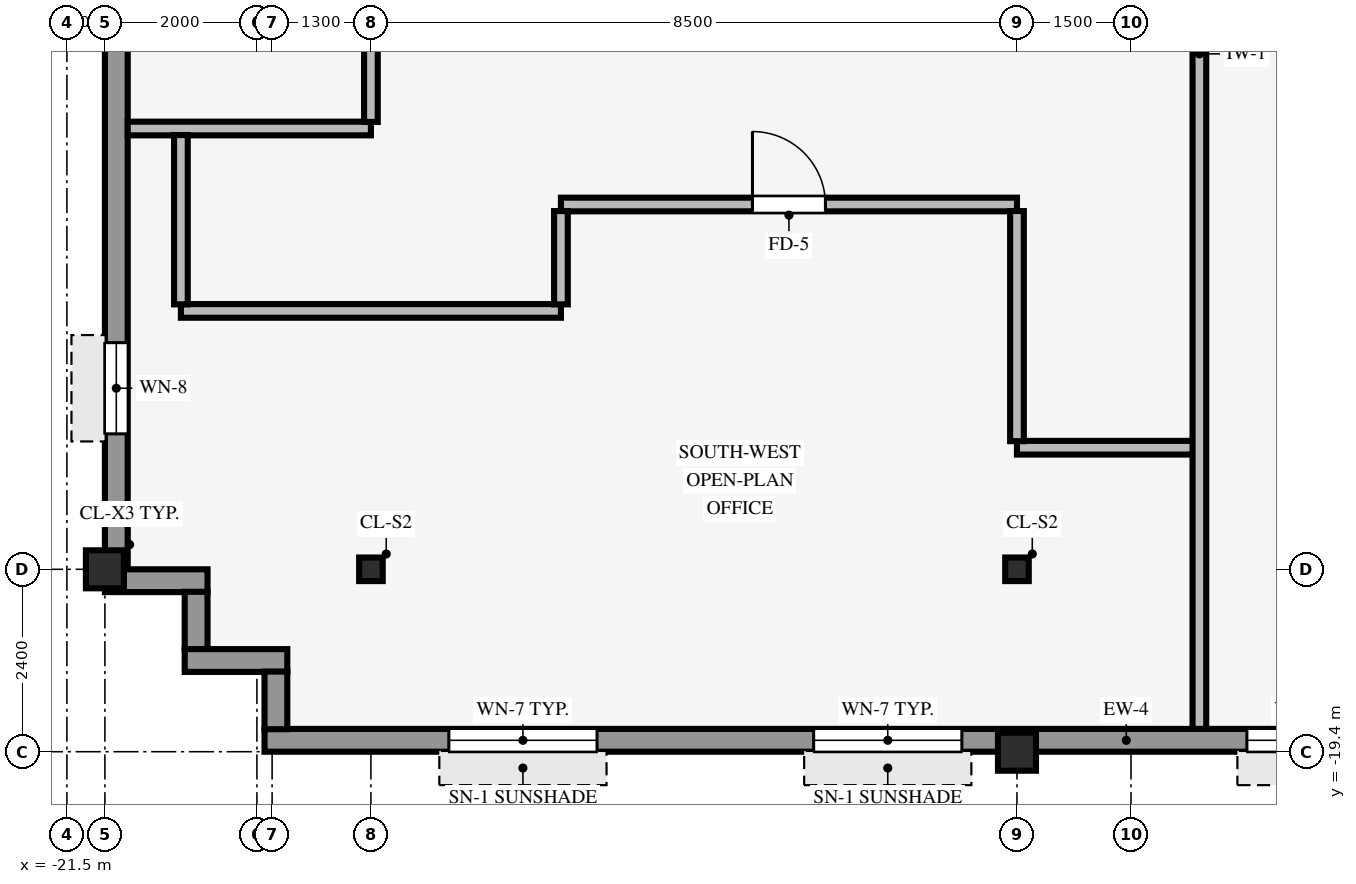
"""IFC4 building model, lengths in metres.
Left out: names, types, materials, properties, quantities, classifications, styles, units other than length and angle.
Written with IfcOpenShell. Run it as: python <this file> out.ifc"""

import sys

from ifc_helpers import new_model, si_unit, direction, frame, frame_2d, origin, origin_2d, place, context, subcontext, project, spatial, rectangle, hollow_rectangle, i_section, extrude, source, transform, mapped, element, fill, save


model = new_model("IFC4")
c1 = context("Model", 3, precision=1e-05, world=origin(), true_north=direction((0.0, 1.0)))
c2 = subcontext(c1, "Body", "Model", "MODEL_VIEW")
j1 = project(units=[si_unit("LENGTHUNIT", "METRE"), si_unit("PLANEANGLEUNIT", "RADIAN")], contexts=[c1])
p1 = place(None, origin())
s1 = spatial("IfcSite", under=j1, at=p1, CompositionType="ELEMENT")
p2 = place(p1, origin())
s2 = spatial("IfcBuilding", under=s1, at=p2, CompositionType="ELEMENT")
p3 = place(p2, frame((0.0, 0.0, 245.65)))
s3 = spatial("IfcBuildingStorey", under=s2, at=p3, CompositionType="ELEMENT", Elevation=245.65)
p4 = place(p3, frame((-21.0, -17.0, -0.4), z_axis=(0.0, 0.0, 1.0), x_axis=(1.0, 0.0, 0.0)))
e1 = element("IfcColumn", 1, at=p4, inside=s3, PredefinedType="COLUMN", context=c2, shape_type="SweptSolid", body=[
    extrude(hollow_rectangle(XDim=0.5, YDim=0.5, WallThickness=0.032, InnerFilletRadius=0.032, OuterFilletRadius=0.064, at=origin_2d()), origin(), (0.0, 0.0, 1.0), 3.77),
])
p5 = place(p3, frame((-9.0, -19.4, 0.0), z_axis=(0.0, 0.0, 1.0), x_axis=(1.0, 0.0, 0.0)))
e2 = element("IfcColumn", 2, at=p5, inside=s3, PredefinedType="COLUMN", context=c2, shape_type="SweptSolid", body=[
    extrude(hollow_rectangle(XDim=0.5, YDim=0.5, WallThickness=0.032, InnerFilletRadius=0.032, OuterFilletRadius=0.064, at=origin_2d()), origin(), (0.0, 0.0, 1.0), 3.37),
])
for number, where, z_axis, x_axis in (
    (3, (-17.5, -17.0, 0.0), (0.0, 0.0, 1.0), (1.0, 0.0, 0.0)),
    (4, (-9.0, -17.0, 0.0), (0.0, 0.0, 1.0), (1.0, 0.0, 0.0)),
):
    element("IfcColumn", number, at=place(p3, frame(where, z_axis=z_axis, x_axis=x_axis)), inside=s3, PredefinedType="COLUMN", context=c2, shape_type="SweptSolid", body=[
        extrude(i_section(OverallWidth=0.31, OverallDepth=0.31, WebThickness=0.015, FlangeThickness=0.015, FilletRadius=0.015, at=origin_2d()), origin(), (0.0, 0.0, 1.0), 3.37),
    ])
p6 = place(p3, frame((-18.9, -19.25, 0.0), z_axis=(0.0, 0.0, 1.0), x_axis=(1.0, 0.0, 0.0)))
e5 = element("IfcWall", 5, at=p6, inside=s3, PredefinedType="STANDARD", context=c2, shape_type="SweptSolid", body=[
    extrude(rectangle(XDim=35.6, YDim=0.3, at=frame_2d((17.8, 0.0))), origin(), (0.0, 0.0, 1.0), 2.705),
])
p7 = place(p6, frame((24.15, 0.0, 0.0), z_axis=(0.0, 0.0, 1.0), x_axis=(-1.0, 0.0, 0.0)))
e6 = element("IfcOpeningElement", 6, at=p7, cuts=e5, PredefinedType="OPENING", context=c2, shape_type="SweptSolid", body=[
    extrude(rectangle(XDim=1.05, YDim=2.1, at=frame_2d((0.525, 1.05))), frame((0.0, 0.16, 0.0), z_axis=(0.0, -1.0, 0.0), x_axis=(1.0, 0.0, 0.0)), (0.0, 0.0, 1.0), 0.32),
])
p8 = place(p6, frame((2.425, 0.0, 0.8)))
e7 = element("IfcOpeningElement", 7, at=p8, cuts=e5, PredefinedType="OPENING", context=c2, shape_type="SweptSolid", body=[
    extrude(rectangle(XDim=1.95, YDim=1.48, at=frame_2d((0.975, 0.74))), frame((0.0, 0.16, 0.0), z_axis=(0.0, -1.0, 0.0), x_axis=(1.0, 0.0, 0.0)), (0.0, 0.0, 1.0), 0.32),
])
p9 = place(p6, frame((7.225, 0.0, 0.8)))
e8 = element("IfcOpeningElement", 8, at=p9, cuts=e5, PredefinedType="OPENING", context=c2, shape_type="SweptSolid", body=[
    extrude(rectangle(XDim=1.95, YDim=1.48, at=frame_2d((0.975, 0.74))), frame((0.0, 0.16, 0.0), z_axis=(0.0, -1.0, 0.0), x_axis=(1.0, 0.0, 0.0)), (0.0, 0.0, 1.0), 0.32),
])
p10 = place(p6, frame((12.925, 0.0, 0.8)))
e9 = element("IfcOpeningElement", 9, at=p10, cuts=e5, PredefinedType="OPENING", context=c2, shape_type="SweptSolid", body=[
    extrude(rectangle(XDim=1.95, YDim=1.48, at=frame_2d((0.975, 0.74))), frame((0.0, 0.16, 0.0), z_axis=(0.0, -1.0, 0.0), x_axis=(1.0, 0.0, 0.0)), (0.0, 0.0, 1.0), 0.32),
])
p11 = place(p6, frame((15.925, 0.0, 0.8)))
e10 = element("IfcOpeningElement", 10, at=p11, cuts=e5, PredefinedType="OPENING", context=c2, shape_type="SweptSolid", body=[
    extrude(rectangle(XDim=1.95, YDim=1.48, at=frame_2d((0.975, 0.74))), frame((0.0, 0.16, 0.0), z_axis=(0.0, -1.0, 0.0), x_axis=(1.0, 0.0, 0.0)), (0.0, 0.0, 1.0), 0.32),
])
p12 = place(p6, frame((20.725, 0.0, 0.8)))
e11 = element("IfcOpeningElement", 11, at=p12, cuts=e5, PredefinedType="OPENING", context=c2, shape_type="SweptSolid", body=[
    extrude(rectangle(XDim=1.95, YDim=1.48, at=frame_2d((0.975, 0.74))), frame((0.0, 0.16, 0.0), z_axis=(0.0, -1.0, 0.0), x_axis=(1.0, 0.0, 0.0)), (0.0, 0.0, 1.0), 0.32),
])
p13 = place(p6, frame((31.225, 0.0, 0.8)))
e12 = element("IfcOpeningElement", 12, at=p13, cuts=e5, PredefinedType="OPENING", context=c2, shape_type="SweptSolid", body=[
    extrude(rectangle(XDim=1.95, YDim=1.48, at=frame_2d((0.975, 0.74))), frame((0.0, 0.16, 0.0), z_axis=(0.0, -1.0, 0.0), x_axis=(1.0, 0.0, 0.0)), (0.0, 0.0, 1.0), 0.32),
])
p14 = place(p3, frame((-20.85, -17.004, 0.0), z_axis=(0.0, 0.0, 1.0), x_axis=(0.0, 1.0, 0.0)))
e13 = element("IfcWall", 13, at=p14, inside=s3, PredefinedType="STANDARD", context=c2, shape_type="SweptSolid", body=[
    extrude(rectangle(XDim=34.008, YDim=0.3, at=frame_2d((17.004, 0.0))), origin(), (0.0, 0.0, 1.0), 2.705),
])
p15 = place(p14, frame((11.754, 0.0, 0.0)))
e14 = element("IfcOpeningElement", 14, at=p15, cuts=e13, PredefinedType="OPENING", context=c2, shape_type="SweptSolid", body=[
    extrude(rectangle(XDim=1.05, YDim=2.1, at=frame_2d((0.525, 1.05))), frame((0.0, 0.16, 0.0), z_axis=(0.0, -1.0, 0.0), x_axis=(1.0, 0.0, 0.0)), (0.0, 0.0, 1.0), 0.32),
])
p16 = place(p14, frame((1.786, 0.0, 0.8)))
e15 = element("IfcOpeningElement", 15, at=p16, cuts=e13, PredefinedType="OPENING", context=c2, shape_type="SweptSolid", body=[
    extrude(rectangle(XDim=1.2, YDim=1.48, at=frame_2d((0.6, 0.74))), frame((0.0, 0.16, 0.0), z_axis=(0.0, -1.0, 0.0), x_axis=(1.0, 0.0, 0.0)), (0.0, 0.0, 1.0), 0.32),
])
p17 = place(p14, frame((8.159, 0.0, 0.8)))
e16 = element("IfcOpeningElement", 16, at=p17, cuts=e13, PredefinedType="OPENING", context=c2, shape_type="SweptSolid", body=[
    extrude(rectangle(XDim=1.2, YDim=1.48, at=frame_2d((0.6, 0.74))), frame((0.0, 0.16, 0.0), z_axis=(0.0, -1.0, 0.0), x_axis=(1.0, 0.0, 0.0)), (0.0, 0.0, 1.0), 0.32),
])
p18 = place(p14, frame((13.181, 0.0, 0.8)))
e17 = element("IfcOpeningElement", 17, at=p18, cuts=e13, PredefinedType="OPENING", context=c2, shape_type="SweptSolid", body=[
    extrude(rectangle(XDim=1.2, YDim=1.48, at=frame_2d((0.6, 0.74))), frame((0.0, 0.16, 0.0), z_axis=(0.0, -1.0, 0.0), x_axis=(1.0, 0.0, 0.0)), (0.0, 0.0, 1.0), 0.32),
])
p19 = place(p14, frame((17.754, 0.0, 0.8)))
e18 = element("IfcOpeningElement", 18, at=p19, cuts=e13, PredefinedType="OPENING", context=c2, shape_type="SweptSolid", body=[
    extrude(rectangle(XDim=1.2, YDim=1.48, at=frame_2d((0.6, 0.74))), frame((0.0, 0.16, 0.0), z_axis=(0.0, -1.0, 0.0), x_axis=(1.0, 0.0, 0.0)), (0.0, 0.0, 1.0), 0.32),
])
p20 = place(p14, frame((20.977, 0.0, 0.8)))
e19 = element("IfcOpeningElement", 19, at=p20, cuts=e13, PredefinedType="OPENING", context=c2, shape_type="SweptSolid", body=[
    extrude(rectangle(XDim=1.2, YDim=1.48, at=frame_2d((0.6, 0.74))), frame((0.0, 0.16, 0.0), z_axis=(0.0, -1.0, 0.0), x_axis=(1.0, 0.0, 0.0)), (0.0, 0.0, 1.0), 0.32),
])
p21 = place(p14, frame((24.649, 0.0, 0.8)))
e20 = element("IfcOpeningElement", 20, at=p21, cuts=e13, PredefinedType="OPENING", context=c2, shape_type="SweptSolid", body=[
    extrude(rectangle(XDim=1.2, YDim=1.48, at=frame_2d((0.6, 0.74))), frame((0.0, 0.16, 0.0), z_axis=(0.0, -1.0, 0.0), x_axis=(1.0, 0.0, 0.0)), (0.0, 0.0, 1.0), 0.32),
])
p22 = place(p14, frame((31.022, 0.0, 0.8)))
e21 = element("IfcOpeningElement", 21, at=p22, cuts=e13, PredefinedType="OPENING", context=c2, shape_type="SweptSolid", body=[
    extrude(rectangle(XDim=1.2, YDim=1.48, at=frame_2d((0.6, 0.74))), frame((0.0, 0.16, 0.0), z_axis=(0.0, -1.0, 0.0), x_axis=(1.0, 0.0, 0.0)), (0.0, 0.0, 1.0), 0.32),
])
p23 = place(p3, frame((-21.0, -17.15, 0.0), z_axis=(0.0, 0.0, 1.0), x_axis=(1.0, 0.0, 0.0)))
e22 = element("IfcWall", 22, at=p23, inside=s3, PredefinedType="STANDARD", context=c2, shape_type="SweptSolid", body=[
    extrude(rectangle(XDim=1.35, YDim=0.3, at=frame_2d((0.675, 0.0))), origin(), (0.0, 0.0, 1.0), 2.892),
])
p24 = place(p3, frame((-19.8, -18.054, 0.0), z_axis=(0.0, 0.0, 1.0), x_axis=(0.0, 1.0, 0.0)))
e23 = element("IfcWall", 23, at=p24, inside=s3, PredefinedType="STANDARD", context=c2, shape_type="SweptSolid", body=[
    extrude(rectangle(XDim=0.758, YDim=0.3, at=frame_2d((0.379, 0.0))), origin(), (0.0, 0.0, 1.0), 2.892),
])
p25 = place(p3, frame((-19.95, -18.2, 0.0), z_axis=(0.0, 0.0, 1.0), x_axis=(1.0, 0.0, 0.0)))
e24 = element("IfcWall", 24, at=p25, inside=s3, PredefinedType="STANDARD", context=c2, shape_type="SweptSolid", body=[
    extrude(rectangle(XDim=1.35, YDim=0.3, at=frame_2d((0.675, 0.0))), origin(), (0.0, 0.0, 1.0), 2.892),
])
p26 = place(p3, frame((-18.75, -19.104, 0.0), z_axis=(0.0, 0.0, 1.0), x_axis=(0.0, 1.0, 0.0)))
e25 = element("IfcWall", 25, at=p26, inside=s3, PredefinedType="STANDARD", context=c2, shape_type="SweptSolid", body=[
    extrude(rectangle(XDim=0.758, YDim=0.3, at=frame_2d((0.379, 0.0))), origin(), (0.0, 0.0, 1.0), 2.892),
])
p27 = place(p3, frame((-9.0, -15.4, 0.0), z_axis=(0.0, 0.0, 1.0), x_axis=(1.0, 0.0, 0.0)))
e26 = element("IfcWall", 26, at=p27, inside=s3, PredefinedType="PARTITIONING", context=c2, shape_type="SweptSolid", body=[
    extrude(rectangle(XDim=2.324, YDim=0.18, at=frame_2d((1.162, 0.0))), origin(), (0.0, 0.0, 1.0), 3.36),
])
p28 = place(p3, frame((-20.0, -13.6, 0.0), z_axis=(0.0, 0.0, 1.0), x_axis=(1.0, 0.0, 0.0)))
e27 = element("IfcWall", 27, at=p28, inside=s3, PredefinedType="PARTITIONING", context=c2, shape_type="SweptSolid", body=[
    extrude(rectangle(XDim=5.0, YDim=0.18, at=frame_2d((2.5, 0.0))), origin(), (0.0, 0.0, 1.0), 3.049),
])
p29 = place(p3, frame((-15.0, -12.2, 0.0), z_axis=(0.0, 0.0, 1.0), x_axis=(1.0, 0.0, 0.0)))
e28 = element("IfcWall", 28, at=p29, inside=s3, PredefinedType="PARTITIONING", context=c2, shape_type="SweptSolid", body=[
    extrude(rectangle(XDim=6.0, YDim=0.18, at=frame_2d((3.0, 0.0))), origin(), (0.0, 0.0, 1.0), 3.36),
])
p30 = place(p29, frame((2.52, 0.0, 0.0)))
e29 = element("IfcOpeningElement", 29, at=p30, cuts=e28, PredefinedType="OPENING", context=c2, shape_type="SweptSolid", body=[
    extrude(rectangle(XDim=0.96, YDim=2.1, at=frame_2d((0.48, 1.05))), frame((0.0, 0.1, 0.0), z_axis=(0.0, -1.0, 0.0), x_axis=(1.0, 0.0, 0.0)), (0.0, 0.0, 1.0), 0.2),
])
p31 = place(p3, frame((-20.7, -11.2, 0.0), z_axis=(0.0, 0.0, 1.0), x_axis=(1.0, 0.0, 0.0)))
e30 = element("IfcWall", 30, at=p31, inside=s3, PredefinedType="PARTITIONING", context=c2, shape_type="SweptSolid", body=[
    extrude(rectangle(XDim=3.2, YDim=0.18, at=frame_2d((1.6, 0.0))), origin(), (0.0, 0.0, 1.0), 3.36),
])
p32 = place(p3, frame((-20.0, -13.514, 0.0), z_axis=(0.0, 0.0, 1.0), x_axis=(0.0, 1.0, 0.0)))
e31 = element("IfcWall", 31, at=p32, inside=s3, PredefinedType="PARTITIONING", context=c2, shape_type="SweptSolid", body=[
    extrude(rectangle(XDim=2.228, YDim=0.18, at=frame_2d((1.114, 0.0))), origin(), (0.0, 0.0, 1.0), 3.36),
])
p33 = place(p3, frame((-17.5, -11.114, 0.0), z_axis=(0.0, 0.0, 1.0), x_axis=(0.0, 1.0, 0.0)))
e32 = element("IfcWall", 32, at=p33, inside=s3, PredefinedType="PARTITIONING", context=c2, shape_type="SweptSolid", body=[
    extrude(rectangle(XDim=1.118, YDim=0.18, at=frame_2d((0.559, 0.0))), origin(), (0.0, 0.0, 1.0), 2.892),
])
p34 = place(p3, frame((-15.0, -13.514, 0.0), z_axis=(0.0, 0.0, 1.0), x_axis=(0.0, 1.0, 0.0)))
e33 = element("IfcWall", 33, at=p34, inside=s3, PredefinedType="PARTITIONING", context=c2, shape_type="SweptSolid", body=[
    extrude(rectangle(XDim=1.228, YDim=0.18, at=frame_2d((0.614, 0.0))), origin(), (0.0, 0.0, 1.0), 3.36),
])
p35 = place(p3, frame((-9.0, -15.314, 0.0), z_axis=(0.0, 0.0, 1.0), x_axis=(0.0, 1.0, 0.0)))
e34 = element("IfcWall", 34, at=p35, inside=s3, PredefinedType="PARTITIONING", context=c2, shape_type="SweptSolid", body=[
    extrude(rectangle(XDim=3.028, YDim=0.18, at=frame_2d((1.514, 0.0))), origin(), (0.0, 0.0, 1.0), 2.892),
])
p36 = place(p3, frame((-6.6, -19.1, 0.0), z_axis=(0.0, 0.0, 1.0), x_axis=(0.0, 1.0, 0.0)))
e35 = element("IfcWall", 35, at=p36, inside=s3, PredefinedType="PARTITIONING", context=c2, shape_type="SweptSolid", body=[
    extrude(rectangle(XDim=17.764, YDim=0.18, at=frame_2d((8.882, 0.0))), origin(), (0.0, 0.0, 1.0), 3.36),
])
m1 = source(origin(), c2, "Body", "SweptSolid", [
    extrude(rectangle(XDim=1.95, YDim=1.48, at=frame_2d((0.975, 0.74))), frame((0.0, 0.03, 0.0), z_axis=(0.0, -1.0, 0.0), x_axis=(1.0, 0.0, 0.0)), (0.0, 0.0, 1.0), 0.06),
])
p37 = place(p8, origin())
e36 = element("IfcWindow", 36, at=p37, inside=s3, PartitioningType="SINGLE_PANEL", PredefinedType="WINDOW", context=c2, shape_type="MappedRepresentation", body=[
    mapped(m1, transform((0.0, 0.0, 0.0), scale=1.0)),
])
fill(e7, e36)
p38 = place(p9, origin())
e37 = element("IfcWindow", 37, at=p38, inside=s3, PartitioningType="SINGLE_PANEL", PredefinedType="WINDOW", context=c2, shape_type="MappedRepresentation", body=[
    mapped(m1, transform((0.0, 0.0, 0.0), scale=1.0)),
])
fill(e8, e37)
p39 = place(p10, origin())
e38 = element("IfcWindow", 38, at=p39, inside=s3, PartitioningType="SINGLE_PANEL", PredefinedType="WINDOW", context=c2, shape_type="MappedRepresentation", body=[
    mapped(m1, transform((0.0, 0.0, 0.0), scale=1.0)),
])
fill(e9, e38)
m2 = source(origin(), c2, "Body", "SweptSolid", [
    extrude(rectangle(XDim=1.2, YDim=1.48, at=frame_2d((0.6, 0.74))), frame((0.0, 0.03, 0.0), z_axis=(0.0, -1.0, 0.0), x_axis=(1.0, 0.0, 0.0)), (0.0, 0.0, 1.0), 0.06),
])
p40 = place(p16, origin())
e39 = element("IfcWindow", 39, at=p40, inside=s3, PartitioningType="SINGLE_PANEL", PredefinedType="WINDOW", context=c2, shape_type="MappedRepresentation", body=[
    mapped(m2, transform((0.0, 0.0, 0.0), scale=1.0)),
])
fill(e15, e39)
m3 = source(origin(), c2, "Body", "SweptSolid", [
    extrude(rectangle(XDim=0.96, YDim=2.1, at=frame_2d((0.48, 1.05))), frame((0.0, 0.025, 0.0), z_axis=(0.0, -1.0, 0.0), x_axis=(1.0, 0.0, 0.0)), (0.0, 0.0, 1.0), 0.05),
])
p41 = place(p30, origin())
e40 = element("IfcDoor", 40, at=p41, inside=s3, OperationType="SINGLE_SWING_LEFT", PredefinedType="DOOR", context=c2, shape_type="MappedRepresentation", body=[
    mapped(m3, transform((0.0, 0.0, 0.0), scale=1.0)),
])
fill(e29, e40)
save(model, sys.argv[1])
